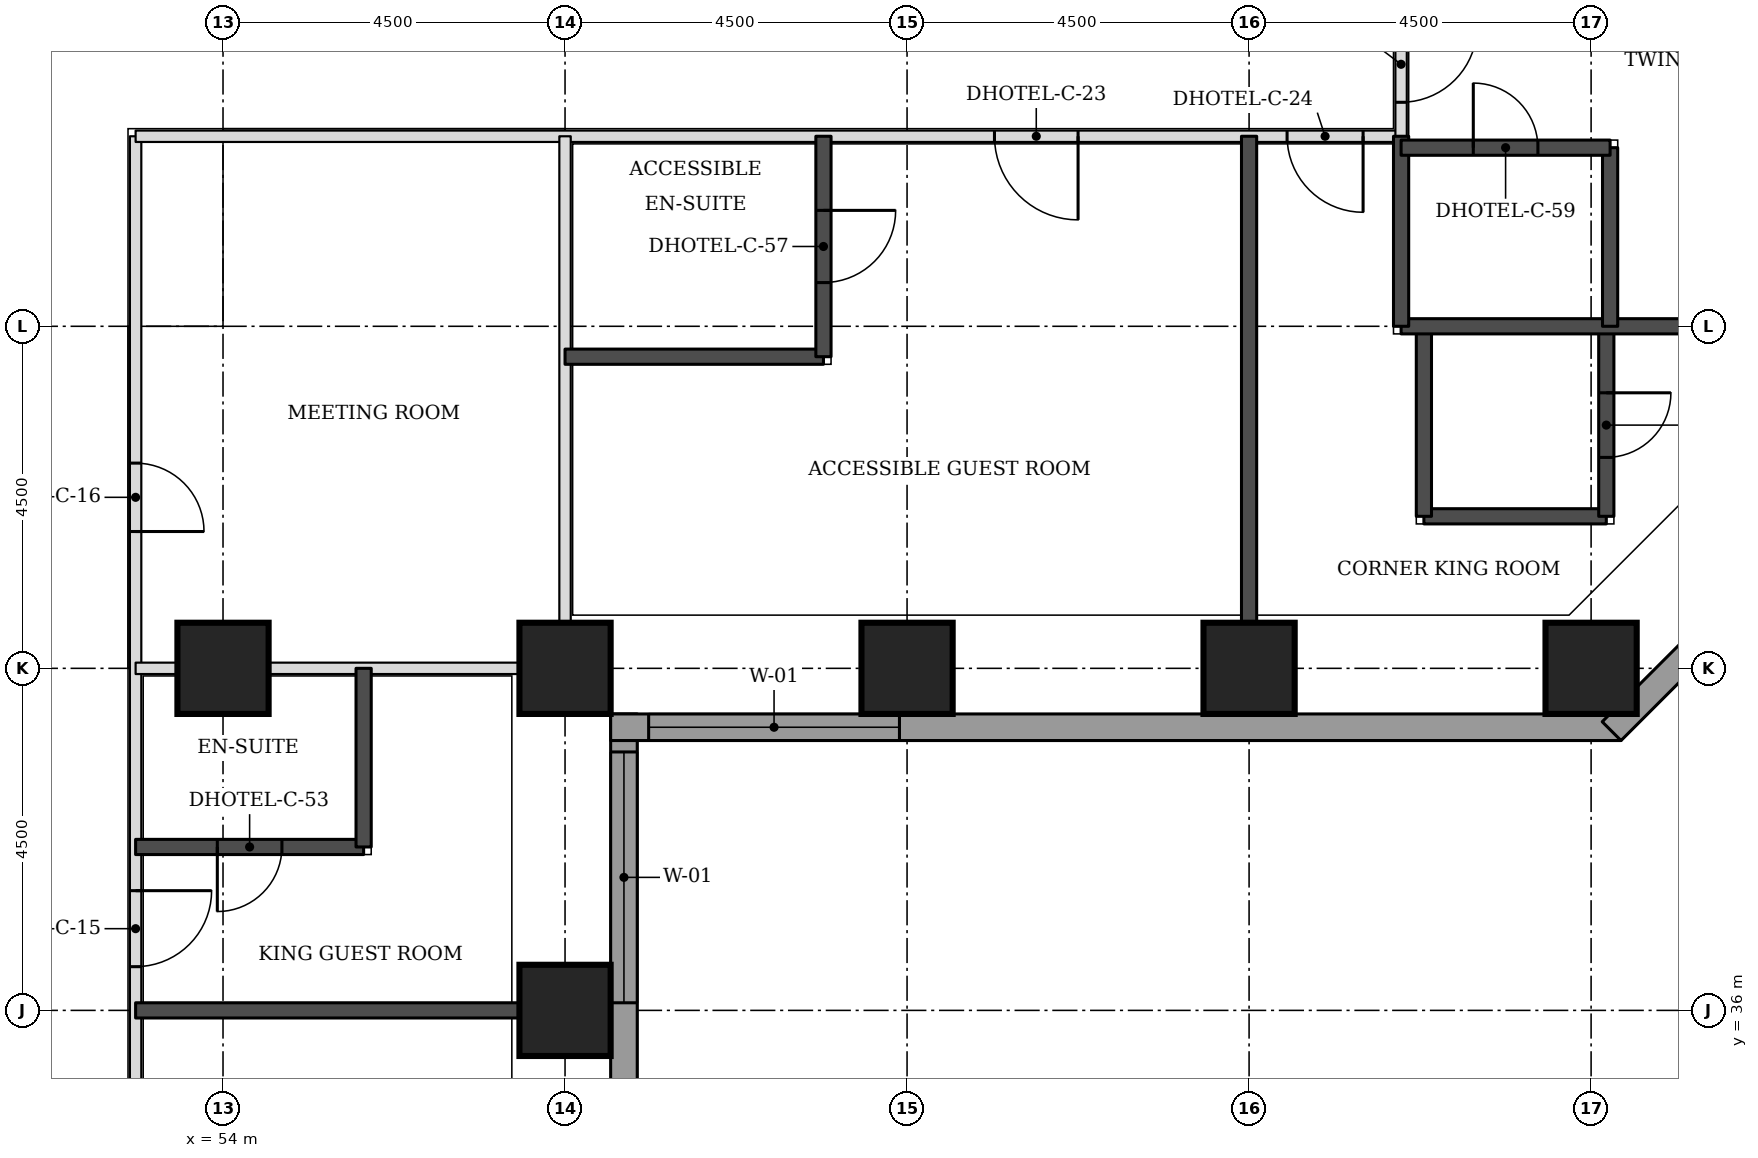
"""IFC4 building model, lengths in metres.
Left out: names, types, materials, properties, quantities, classifications, styles, units other than length and angle.
Written with IfcOpenShell. Run it as: python <this file> out.ifc"""

import sys

from ifc_helpers import new_model, si_unit, direction, frame, frame_2d, origin, origin_2d, place, context, subcontext, project, spatial, rectangle, extrude, element, fill, save


model = new_model("IFC4")
c1 = context("Model", 3, precision=1e-05, world=origin(), true_north=direction((0.0, 1.0)))
c2 = subcontext(c1, "Body", "Model", "MODEL_VIEW")
j1 = project(units=[si_unit("LENGTHUNIT", "METRE"), si_unit("PLANEANGLEUNIT", "RADIAN")], contexts=[c1])
p1 = place(None, origin())
s1 = spatial("IfcSite", under=j1, at=p1, CompositionType="ELEMENT")
p2 = place(p1, origin())
s2 = spatial("IfcBuilding", under=s1, at=p2, CompositionType="ELEMENT")
p3 = place(p2, frame((0.0, 0.0, 33.0)))
s3 = spatial("IfcBuildingStorey", under=s2, at=p3, CompositionType="ELEMENT", Elevation=33.0)
for number, where, z_axis, x_axis in (
    (1, (58.5, 36.0, 0.0), (0.0, 0.0, 1.0), (1.0, 0.0, 0.0)),
    (2, (54.0, 40.5, 0.0), (0.0, 0.0, 1.0), (1.0, 0.0, 0.0)),
    (3, (58.5, 40.5, 0.0), (0.0, 0.0, 1.0), (1.0, 0.0, 0.0)),
    (4, (63.0, 40.5, 0.0), (0.0, 0.0, 1.0), (1.0, 0.0, 0.0)),
    (5, (67.5, 40.5, 0.0), (0.0, 0.0, 1.0), (1.0, 0.0, 0.0)),
    (6, (72.0, 40.5, 0.0), (0.0, 0.0, 1.0), (1.0, 0.0, 0.0)),
):
    element("IfcColumn", number, at=place(p3, frame(where, z_axis=z_axis, x_axis=x_axis)), inside=s3, PredefinedType="COLUMN", context=c2, shape_type="SweptSolid", body=[
        extrude(rectangle(XDim=1.2, YDim=1.2, at=origin_2d()), origin(), (0.0, 0.0, 1.0), 3.3),
    ])
p4 = place(p3, frame((59.275, 22.106, 0.0), z_axis=(0.0, 0.0, 1.0), x_axis=(0.0, 1.0, 0.0)))
e7 = element("IfcWall", 7, at=p4, inside=s3, PredefinedType="STANDARD", context=c2, shape_type="SweptSolid", body=[
    extrude(rectangle(XDim=17.793, YDim=0.35, at=frame_2d((8.897, 0.0))), origin(), (0.0, 0.0, 1.0), 3.055),
])
p5 = place(p4, frame((5.493, 0.0, 0.8)))
e8 = element("IfcOpeningElement", 8, at=p5, cuts=e7, PredefinedType="OPENING", context=c2, shape_type="SweptSolid", body=[
    extrude(rectangle(XDim=3.3, YDim=1.5, at=frame_2d((1.65, 0.75))), frame((0.0, 0.185, 0.0), z_axis=(0.0, -1.0, 0.0), x_axis=(1.0, 0.0, 0.0)), (0.0, 0.0, 1.0), 0.37),
])
p6 = place(p4, frame((13.993, 0.0, 0.8)))
e9 = element("IfcOpeningElement", 9, at=p6, cuts=e7, PredefinedType="OPENING", context=c2, shape_type="SweptSolid", body=[
    extrude(rectangle(XDim=3.3, YDim=1.5, at=frame_2d((1.65, 0.75))), frame((0.0, 0.185, 0.0), z_axis=(0.0, -1.0, 0.0), x_axis=(1.0, 0.0, 0.0)), (0.0, 0.0, 1.0), 0.37),
])
p7 = place(p3, frame((59.1, 39.725, 0.0), z_axis=(0.0, 0.0, 1.0), x_axis=(1.0, 0.0, 0.0)))
e10 = element("IfcWall", 10, at=p7, inside=s3, PredefinedType="STANDARD", context=c2, shape_type="SweptSolid", body=[
    extrude(rectangle(XDim=13.293, YDim=0.35, at=frame_2d((6.647, 0.0))), origin(), (0.0, 0.0, 1.0), 3.055),
])
p8 = place(p7, frame((0.5, 0.0, 0.8)))
e11 = element("IfcOpeningElement", 11, at=p8, cuts=e10, PredefinedType="OPENING", context=c2, shape_type="SweptSolid", body=[
    extrude(rectangle(XDim=3.3, YDim=1.5, at=frame_2d((1.65, 0.75))), frame((0.0, 0.185, 0.0), z_axis=(0.0, -1.0, 0.0), x_axis=(1.0, 0.0, 0.0)), (0.0, 0.0, 1.0), 0.37),
])
p9 = place(p3, frame((72.27, 39.674, 0.0), z_axis=(0.0, 0.0, 1.0), x_axis=(0.707106781187, 0.707106781187, 0.0)))
e12 = element("IfcWall", 12, at=p9, inside=s3, PredefinedType="STANDARD", context=c2, shape_type="SweptSolid", body=[
    extrude(rectangle(XDim=7.151, YDim=0.35, at=frame_2d((3.576, 0.0))), origin(), (0.0, 0.0, 1.0), 3.055),
])
p10 = place(p9, frame((1.926, 0.0, 0.8)))
e13 = element("IfcOpeningElement", 13, at=p10, cuts=e12, PredefinedType="OPENING", context=c2, shape_type="SweptSolid", body=[
    extrude(rectangle(XDim=3.3, YDim=1.5, at=frame_2d((1.65, 0.75))), frame((0.0, 0.185, 0.0), z_axis=(0.0, -1.0, 0.0), x_axis=(1.0, 0.0, 0.0)), (0.0, 0.0, 1.0), 0.37),
])
p11 = place(p3, frame((52.85, 25.15, 0.0), z_axis=(0.0, 0.0, 1.0), x_axis=(0.0, 1.0, 0.0)))
e14 = element("IfcWall", 14, at=p11, inside=s3, PredefinedType="PARTITIONING", context=c2, shape_type="SweptSolid", body=[
    extrude(rectangle(XDim=22.35, YDim=0.15, at=frame_2d((11.175, 0.0))), origin(), (0.0, 0.0, 1.0), 3.08),
])
p12 = place(p11, frame((0.347, 0.0, 0.0)))
e15 = element("IfcOpeningElement", 15, at=p12, cuts=e14, PredefinedType="OPENING", context=c2, shape_type="SweptSolid", body=[
    extrude(rectangle(XDim=1.0, YDim=2.1, at=frame_2d((0.5, 1.05))), frame((0.0, 0.085, 0.0), z_axis=(0.0, -1.0, 0.0), x_axis=(1.0, 0.0, 0.0)), (0.0, 0.0, 1.0), 0.17),
])
p13 = place(p11, frame((7.075, 0.0, 0.0)))
e16 = element("IfcOpeningElement", 16, at=p13, cuts=e14, PredefinedType="OPENING", context=c2, shape_type="SweptSolid", body=[
    extrude(rectangle(XDim=1.0, YDim=2.1, at=frame_2d((0.5, 1.05))), frame((0.0, 0.085, 0.0), z_axis=(0.0, -1.0, 0.0), x_axis=(1.0, 0.0, 0.0)), (0.0, 0.0, 1.0), 0.17),
])
p14 = place(p11, frame((11.425, 0.0, 0.0)))
e17 = element("IfcOpeningElement", 17, at=p14, cuts=e14, PredefinedType="OPENING", context=c2, shape_type="SweptSolid", body=[
    extrude(rectangle(XDim=1.0, YDim=2.1, at=frame_2d((0.5, 1.05))), frame((0.0, 0.085, 0.0), z_axis=(0.0, -1.0, 0.0), x_axis=(1.0, 0.0, 0.0)), (0.0, 0.0, 1.0), 0.17),
])
p15 = place(p11, frame((17.15, 0.0, 0.0)))
e18 = element("IfcOpeningElement", 18, at=p15, cuts=e14, PredefinedType="OPENING", context=c2, shape_type="SweptSolid", body=[
    extrude(rectangle(XDim=0.9, YDim=2.1, at=frame_2d((0.45, 1.05))), frame((0.0, 0.085, 0.0), z_axis=(0.0, -1.0, 0.0), x_axis=(1.0, 0.0, 0.0)), (0.0, 0.0, 1.0), 0.17),
])
p16 = place(p3, frame((52.85, 47.5, 0.0), z_axis=(0.0, 0.0, 1.0), x_axis=(1.0, 0.0, 0.0)))
e19 = element("IfcWall", 19, at=p16, inside=s3, PredefinedType="PARTITIONING", context=c2, shape_type="SweptSolid", body=[
    extrude(rectangle(XDim=16.65, YDim=0.15, at=frame_2d((8.325, 0.0))), origin(), (0.0, 0.0, 1.0), 3.08),
])
p17 = place(p16, frame((11.3, 0.0, 0.0)))
e20 = element("IfcOpeningElement", 20, at=p17, cuts=e19, PredefinedType="OPENING", context=c2, shape_type="SweptSolid", body=[
    extrude(rectangle(XDim=1.1, YDim=2.1, at=frame_2d((0.55, 1.05))), frame((0.0, 0.085, 0.0), z_axis=(0.0, -1.0, 0.0), x_axis=(1.0, 0.0, 0.0)), (0.0, 0.0, 1.0), 0.17),
])
p18 = place(p16, frame((15.15, 0.0, 0.0)))
e21 = element("IfcOpeningElement", 21, at=p18, cuts=e19, PredefinedType="OPENING", context=c2, shape_type="SweptSolid", body=[
    extrude(rectangle(XDim=1.0, YDim=2.1, at=frame_2d((0.5, 1.05))), frame((0.0, 0.085, 0.0), z_axis=(0.0, -1.0, 0.0), x_axis=(1.0, 0.0, 0.0)), (0.0, 0.0, 1.0), 0.17),
])
p19 = place(p3, frame((69.5, 47.5, 0.0), z_axis=(0.0, 0.0, 1.0), x_axis=(0.0, 1.0, 0.0)))
e22 = element("IfcWall", 22, at=p19, inside=s3, PredefinedType="PARTITIONING", context=c2, shape_type="SweptSolid", body=[
    extrude(rectangle(XDim=26.5, YDim=0.15, at=frame_2d((13.25, 0.0))), origin(), (0.0, 0.0, 1.0), 3.08),
])
p20 = place(p19, frame((25.053, 0.0, 0.0)))
e23 = element("IfcOpeningElement", 23, at=p20, cuts=e22, PredefinedType="OPENING", context=c2, shape_type="SweptSolid", body=[
    extrude(rectangle(XDim=1.0, YDim=2.1, at=frame_2d((0.5, 1.05))), frame((0.0, 0.085, 0.0), z_axis=(0.0, -1.0, 0.0), x_axis=(1.0, 0.0, 0.0)), (0.0, 0.0, 1.0), 0.17),
])
p21 = place(p19, frame((18.275, 0.0, 0.0)))
e24 = element("IfcOpeningElement", 24, at=p21, cuts=e22, PredefinedType="OPENING", context=c2, shape_type="SweptSolid", body=[
    extrude(rectangle(XDim=1.0, YDim=2.1, at=frame_2d((0.5, 1.05))), frame((0.0, 0.085, 0.0), z_axis=(0.0, -1.0, 0.0), x_axis=(1.0, 0.0, 0.0)), (0.0, 0.0, 1.0), 0.17),
])
p22 = place(p19, frame((12.15, 0.0, 0.0)))
e25 = element("IfcOpeningElement", 25, at=p22, cuts=e22, PredefinedType="OPENING", context=c2, shape_type="SweptSolid", body=[
    extrude(rectangle(XDim=1.1, YDim=2.1, at=frame_2d((0.55, 1.05))), frame((0.0, 0.085, 0.0), z_axis=(0.0, -1.0, 0.0), x_axis=(1.0, 0.0, 0.0)), (0.0, 0.0, 1.0), 0.17),
])
p23 = place(p19, frame((2.825, 0.0, 0.0)))
e26 = element("IfcOpeningElement", 26, at=p23, cuts=e22, PredefinedType="OPENING", context=c2, shape_type="SweptSolid", body=[
    extrude(rectangle(XDim=1.0, YDim=2.1, at=frame_2d((0.5, 1.05))), frame((0.0, 0.085, 0.0), z_axis=(0.0, -1.0, 0.0), x_axis=(1.0, 0.0, 0.0)), (0.0, 0.0, 1.0), 0.17),
])
p24 = place(p19, frame((0.447, 0.0, 0.0)))
e27 = element("IfcOpeningElement", 27, at=p24, cuts=e22, PredefinedType="OPENING", context=c2, shape_type="SweptSolid", body=[
    extrude(rectangle(XDim=1.0, YDim=2.1, at=frame_2d((0.5, 1.05))), frame((0.0, 0.085, 0.0), z_axis=(0.0, -1.0, 0.0), x_axis=(1.0, 0.0, 0.0)), (0.0, 0.0, 1.0), 0.17),
])
p25 = place(p3, frame((52.85, 36.0, 0.0), z_axis=(0.0, 0.0, 1.0), x_axis=(1.0, 0.0, 0.0)))
e28 = element("IfcWall", 28, at=p25, inside=s3, PredefinedType="SOLIDWALL", context=c2, shape_type="SweptSolid", body=[
    extrude(rectangle(XDim=5.05, YDim=0.2, at=frame_2d((2.525, 0.0))), origin(), (0.0, 0.0, 1.0), 3.08),
])
p26 = place(p3, frame((52.85, 38.15, 0.0), z_axis=(0.0, 0.0, 1.0), x_axis=(1.0, 0.0, 0.0)))
e29 = element("IfcWall", 29, at=p26, inside=s3, PredefinedType="SOLIDWALL", context=c2, shape_type="SweptSolid", body=[
    extrude(rectangle(XDim=3.0, YDim=0.2, at=frame_2d((1.5, 0.0))), origin(), (0.0, 0.0, 1.0), 3.08),
])
p27 = place(p26, frame((1.075, 0.0, 0.0)))
e30 = element("IfcOpeningElement", 30, at=p27, cuts=e29, PredefinedType="OPENING", context=c2, shape_type="SweptSolid", body=[
    extrude(rectangle(XDim=0.85, YDim=2.1, at=frame_2d((0.425, 1.05))), frame((0.0, 0.11, 0.0), z_axis=(0.0, -1.0, 0.0), x_axis=(1.0, 0.0, 0.0)), (0.0, 0.0, 1.0), 0.22),
])
p28 = place(p3, frame((55.85, 38.15, 0.0), z_axis=(0.0, 0.0, 1.0), x_axis=(0.0, 1.0, 0.0)))
e31 = element("IfcWall", 31, at=p28, inside=s3, PredefinedType="SOLIDWALL", context=c2, shape_type="SweptSolid", body=[
    extrude(rectangle(XDim=2.35, YDim=0.2, at=frame_2d((1.175, 0.0))), origin(), (0.0, 0.0, 1.0), 3.08),
])
p29 = place(p3, frame((67.5, 41.1, 0.0), z_axis=(0.0, 0.0, 1.0), x_axis=(0.0, 1.0, 0.0)))
e32 = element("IfcWall", 32, at=p29, inside=s3, PredefinedType="SOLIDWALL", context=c2, shape_type="SweptSolid", body=[
    extrude(rectangle(XDim=6.4, YDim=0.2, at=frame_2d((3.2, 0.0))), origin(), (0.0, 0.0, 1.0), 3.08),
])
p30 = place(p3, frame((69.8, 42.5, 0.0), z_axis=(0.0, 0.0, 1.0), x_axis=(1.0, 0.0, 0.0)))
e33 = element("IfcWall", 33, at=p30, inside=s3, PredefinedType="SOLIDWALL", context=c2, shape_type="SweptSolid", body=[
    extrude(rectangle(XDim=2.4, YDim=0.2, at=frame_2d((1.2, 0.0))), origin(), (0.0, 0.0, 1.0), 3.08),
])
p31 = place(p3, frame((69.8, 42.5, 0.0), z_axis=(0.0, 0.0, 1.0), x_axis=(0.0, 1.0, 0.0)))
e34 = element("IfcWall", 34, at=p31, inside=s3, PredefinedType="SOLIDWALL", context=c2, shape_type="SweptSolid", body=[
    extrude(rectangle(XDim=2.5, YDim=0.2, at=frame_2d((1.25, 0.0))), origin(), (0.0, 0.0, 1.0), 3.08),
])
p32 = place(p3, frame((72.2, 42.5, 0.0), z_axis=(0.0, 0.0, 1.0), x_axis=(0.0, 1.0, 0.0)))
e35 = element("IfcWall", 35, at=p32, inside=s3, PredefinedType="SOLIDWALL", context=c2, shape_type="SweptSolid", body=[
    extrude(rectangle(XDim=2.5, YDim=0.2, at=frame_2d((1.25, 0.0))), origin(), (0.0, 0.0, 1.0), 3.08),
])
p33 = place(p32, frame((0.775, 0.0, 0.0)))
e36 = element("IfcOpeningElement", 36, at=p33, cuts=e35, PredefinedType="OPENING", context=c2, shape_type="SweptSolid", body=[
    extrude(rectangle(XDim=0.85, YDim=2.1, at=frame_2d((0.425, 1.05))), frame((0.0, 0.11, 0.0), z_axis=(0.0, -1.0, 0.0), x_axis=(1.0, 0.0, 0.0)), (0.0, 0.0, 1.0), 0.22),
])
p34 = place(p3, frame((58.5, 44.6, 0.0), z_axis=(0.0, 0.0, 1.0), x_axis=(1.0, 0.0, 0.0)))
e37 = element("IfcWall", 37, at=p34, inside=s3, PredefinedType="SOLIDWALL", context=c2, shape_type="SweptSolid", body=[
    extrude(rectangle(XDim=3.4, YDim=0.2, at=frame_2d((1.7, 0.0))), origin(), (0.0, 0.0, 1.0), 3.08),
])
p35 = place(p3, frame((61.9, 44.6, 0.0), z_axis=(0.0, 0.0, 1.0), x_axis=(0.0, 1.0, 0.0)))
e38 = element("IfcWall", 38, at=p35, inside=s3, PredefinedType="SOLIDWALL", context=c2, shape_type="SweptSolid", body=[
    extrude(rectangle(XDim=2.9, YDim=0.2, at=frame_2d((1.45, 0.0))), origin(), (0.0, 0.0, 1.0), 3.08),
])
p36 = place(p35, frame((0.975, 0.0, 0.0)))
e39 = element("IfcOpeningElement", 39, at=p36, cuts=e38, PredefinedType="OPENING", context=c2, shape_type="SweptSolid", body=[
    extrude(rectangle(XDim=0.95, YDim=2.1, at=frame_2d((0.475, 1.05))), frame((0.0, 0.11, 0.0), z_axis=(0.0, -1.0, 0.0), x_axis=(1.0, 0.0, 0.0)), (0.0, 0.0, 1.0), 0.22),
])
p37 = place(p3, frame((69.5, 45.0, 0.0), z_axis=(0.0, 0.0, 1.0), x_axis=(1.0, 0.0, 0.0)))
e40 = element("IfcWall", 40, at=p37, inside=s3, PredefinedType="SOLIDWALL", context=c2, shape_type="SweptSolid", body=[
    extrude(rectangle(XDim=6.4, YDim=0.2, at=frame_2d((3.2, 0.0))), origin(), (0.0, 0.0, 1.0), 3.08),
])
p38 = place(p3, frame((69.5, 45.0, 0.0), z_axis=(0.0, 0.0, 1.0), x_axis=(0.0, 1.0, 0.0)))
e41 = element("IfcWall", 41, at=p38, inside=s3, PredefinedType="SOLIDWALL", context=c2, shape_type="SweptSolid", body=[
    extrude(rectangle(XDim=2.5, YDim=0.2, at=frame_2d((1.25, 0.0))), origin(), (0.0, 0.0, 1.0), 3.08),
])
p39 = place(p3, frame((72.25, 45.0, 0.0), z_axis=(0.0, 0.0, 1.0), x_axis=(0.0, 1.0, 0.0)))
e42 = element("IfcWall", 42, at=p39, inside=s3, PredefinedType="SOLIDWALL", context=c2, shape_type="SweptSolid", body=[
    extrude(rectangle(XDim=2.35, YDim=0.2, at=frame_2d((1.175, 0.0))), origin(), (0.0, 0.0, 1.0), 3.08),
])
p40 = place(p3, frame((69.5, 47.35, 0.0), z_axis=(0.0, 0.0, 1.0), x_axis=(1.0, 0.0, 0.0)))
e43 = element("IfcWall", 43, at=p40, inside=s3, PredefinedType="SOLIDWALL", context=c2, shape_type="SweptSolid", body=[
    extrude(rectangle(XDim=2.75, YDim=0.2, at=frame_2d((1.375, 0.0))), origin(), (0.0, 0.0, 1.0), 3.08),
])
p41 = place(p40, frame((0.95, 0.0, 0.0)))
e44 = element("IfcOpeningElement", 44, at=p41, cuts=e43, PredefinedType="OPENING", context=c2, shape_type="SweptSolid", body=[
    extrude(rectangle(XDim=0.85, YDim=2.1, at=frame_2d((0.425, 1.05))), frame((0.0, 0.11, 0.0), z_axis=(0.0, -1.0, 0.0), x_axis=(1.0, 0.0, 0.0)), (0.0, 0.0, 1.0), 0.22),
])
p42 = place(p3, frame((52.85, 40.5, 0.0), z_axis=(0.0, 0.0, 1.0), x_axis=(1.0, 0.0, 0.0)))
e45 = element("IfcWall", 45, at=p42, inside=s3, PredefinedType="PARTITIONING", context=c2, shape_type="SweptSolid", body=[
    extrude(rectangle(XDim=5.05, YDim=0.15, at=frame_2d((2.525, 0.0))), origin(), (0.0, 0.0, 1.0), 2.33),
])
p43 = place(p3, frame((58.5, 41.1, 0.0), z_axis=(0.0, 0.0, 1.0), x_axis=(0.0, 1.0, 0.0)))
e46 = element("IfcWall", 46, at=p43, inside=s3, PredefinedType="PARTITIONING", context=c2, shape_type="SweptSolid", body=[
    extrude(rectangle(XDim=6.4, YDim=0.15, at=frame_2d((3.2, 0.0))), origin(), (0.0, 0.0, 1.0), 3.08),
])
p44 = place(p6, origin())
e47 = element("IfcWindow", 47, at=p44, inside=s3, PartitioningType="SINGLE_PANEL", PredefinedType="WINDOW", context=c2, shape_type="SweptSolid", body=[
    extrude(rectangle(XDim=3.3, YDim=1.5, at=frame_2d((1.65, 0.75))), frame((0.0, 0.085, 0.0), z_axis=(0.0, -1.0, 0.0), x_axis=(1.0, 0.0, 0.0)), (0.0, 0.0, 1.0), 0.06),
])
fill(e9, e47)
p45 = place(p8, origin())
e48 = element("IfcWindow", 48, at=p45, inside=s3, PartitioningType="SINGLE_PANEL", PredefinedType="WINDOW", context=c2, shape_type="SweptSolid", body=[
    extrude(rectangle(XDim=3.3, YDim=1.5, at=frame_2d((1.65, 0.75))), frame((0.0, 0.085, 0.0), z_axis=(0.0, -1.0, 0.0), x_axis=(1.0, 0.0, 0.0)), (0.0, 0.0, 1.0), 0.06),
])
fill(e11, e48)
p46 = place(p14, frame((1.0, 0.0, 0.0), z_axis=(0.0, 0.0, 1.0), x_axis=(-1.0, 0.0, 0.0)))
e49 = element("IfcDoor", 49, at=p46, inside=s3, OperationType="SINGLE_SWING_LEFT", PredefinedType="DOOR", context=c2, shape_type="SweptSolid", body=[
    extrude(rectangle(XDim=1.0, YDim=2.1, at=frame_2d((0.5, 1.05))), frame((0.0, 0.025, 0.0), z_axis=(0.0, -1.0, 0.0), x_axis=(1.0, 0.0, 0.0)), (0.0, 0.0, 1.0), 0.05),
])
fill(e17, e49)
p47 = place(p27, frame((0.85, 0.0, 0.0), z_axis=(0.0, 0.0, 1.0), x_axis=(-1.0, 0.0, 0.0)))
e50 = element("IfcDoor", 50, at=p47, inside=s3, OperationType="SINGLE_SWING_RIGHT", PredefinedType="DOOR", context=c2, shape_type="SweptSolid", body=[
    extrude(rectangle(XDim=0.85, YDim=2.1, at=frame_2d((0.425, 1.05))), frame((0.0, 0.025, 0.0), z_axis=(0.0, -1.0, 0.0), x_axis=(1.0, 0.0, 0.0)), (0.0, 0.0, 1.0), 0.05),
])
fill(e30, e50)
p48 = place(p24, frame((1.0, 0.0, 0.0), z_axis=(0.0, 0.0, 1.0), x_axis=(-1.0, 0.0, 0.0)))
e51 = element("IfcDoor", 51, at=p48, inside=s3, OperationType="SINGLE_SWING_LEFT", PredefinedType="DOOR", context=c2, shape_type="SweptSolid", body=[
    extrude(rectangle(XDim=1.0, YDim=2.1, at=frame_2d((0.5, 1.05))), frame((0.0, 0.025, 0.0), z_axis=(0.0, -1.0, 0.0), x_axis=(1.0, 0.0, 0.0)), (0.0, 0.0, 1.0), 0.05),
])
fill(e27, e51)
p49 = place(p41, origin())
e52 = element("IfcDoor", 52, at=p49, inside=s3, OperationType="SINGLE_SWING_LEFT", PredefinedType="DOOR", context=c2, shape_type="SweptSolid", body=[
    extrude(rectangle(XDim=0.85, YDim=2.1, at=frame_2d((0.425, 1.05))), frame((0.0, 0.025, 0.0), z_axis=(0.0, -1.0, 0.0), x_axis=(1.0, 0.0, 0.0)), (0.0, 0.0, 1.0), 0.05),
])
fill(e44, e52)
p50 = place(p17, frame((1.1, 0.0, 0.0), z_axis=(0.0, 0.0, 1.0), x_axis=(-1.0, 0.0, 0.0)))
e53 = element("IfcDoor", 53, at=p50, inside=s3, OperationType="SINGLE_SWING_LEFT", PredefinedType="DOOR", context=c2, shape_type="SweptSolid", body=[
    extrude(rectangle(XDim=1.1, YDim=2.1, at=frame_2d((0.55, 1.05))), frame((0.0, 0.025, 0.0), z_axis=(0.0, -1.0, 0.0), x_axis=(1.0, 0.0, 0.0)), (0.0, 0.0, 1.0), 0.05),
])
fill(e20, e53)
p51 = place(p36, frame((0.95, 0.0, 0.0), z_axis=(0.0, 0.0, 1.0), x_axis=(-1.0, 0.0, 0.0)))
e54 = element("IfcDoor", 54, at=p51, inside=s3, OperationType="SINGLE_SWING_LEFT", PredefinedType="DOOR", context=c2, shape_type="SweptSolid", body=[
    extrude(rectangle(XDim=0.95, YDim=2.1, at=frame_2d((0.475, 1.05))), frame((0.0, 0.025, 0.0), z_axis=(0.0, -1.0, 0.0), x_axis=(1.0, 0.0, 0.0)), (0.0, 0.0, 1.0), 0.05),
])
fill(e39, e54)
p52 = place(p18, frame((1.0, 0.0, 0.0), z_axis=(0.0, 0.0, 1.0), x_axis=(-1.0, 0.0, 0.0)))
e55 = element("IfcDoor", 55, at=p52, inside=s3, OperationType="SINGLE_SWING_LEFT", PredefinedType="DOOR", context=c2, shape_type="SweptSolid", body=[
    extrude(rectangle(XDim=1.0, YDim=2.1, at=frame_2d((0.5, 1.05))), frame((0.0, 0.025, 0.0), z_axis=(0.0, -1.0, 0.0), x_axis=(1.0, 0.0, 0.0)), (0.0, 0.0, 1.0), 0.05),
])
fill(e21, e55)
p53 = place(p33, frame((0.85, 0.0, 0.0), z_axis=(0.0, 0.0, 1.0), x_axis=(-1.0, 0.0, 0.0)))
e56 = element("IfcDoor", 56, at=p53, inside=s3, OperationType="SINGLE_SWING_LEFT", PredefinedType="DOOR", context=c2, shape_type="SweptSolid", body=[
    extrude(rectangle(XDim=0.85, YDim=2.1, at=frame_2d((0.425, 1.05))), frame((0.0, 0.025, 0.0), z_axis=(0.0, -1.0, 0.0), x_axis=(1.0, 0.0, 0.0)), (0.0, 0.0, 1.0), 0.05),
])
fill(e36, e56)
p54 = place(p15, frame((0.9, 0.0, 0.0), z_axis=(0.0, 0.0, 1.0), x_axis=(-1.0, 0.0, 0.0)))
e57 = element("IfcDoor", 57, at=p54, inside=s3, OperationType="SINGLE_SWING_RIGHT", PredefinedType="DOOR", context=c2, shape_type="SweptSolid", body=[
    extrude(rectangle(XDim=0.9, YDim=2.1, at=frame_2d((0.45, 1.05))), frame((0.0, 0.025, 0.0), z_axis=(0.0, -1.0, 0.0), x_axis=(1.0, 0.0, 0.0)), (0.0, 0.0, 1.0), 0.05),
])
fill(e18, e57)
save(model, sys.argv[1])
